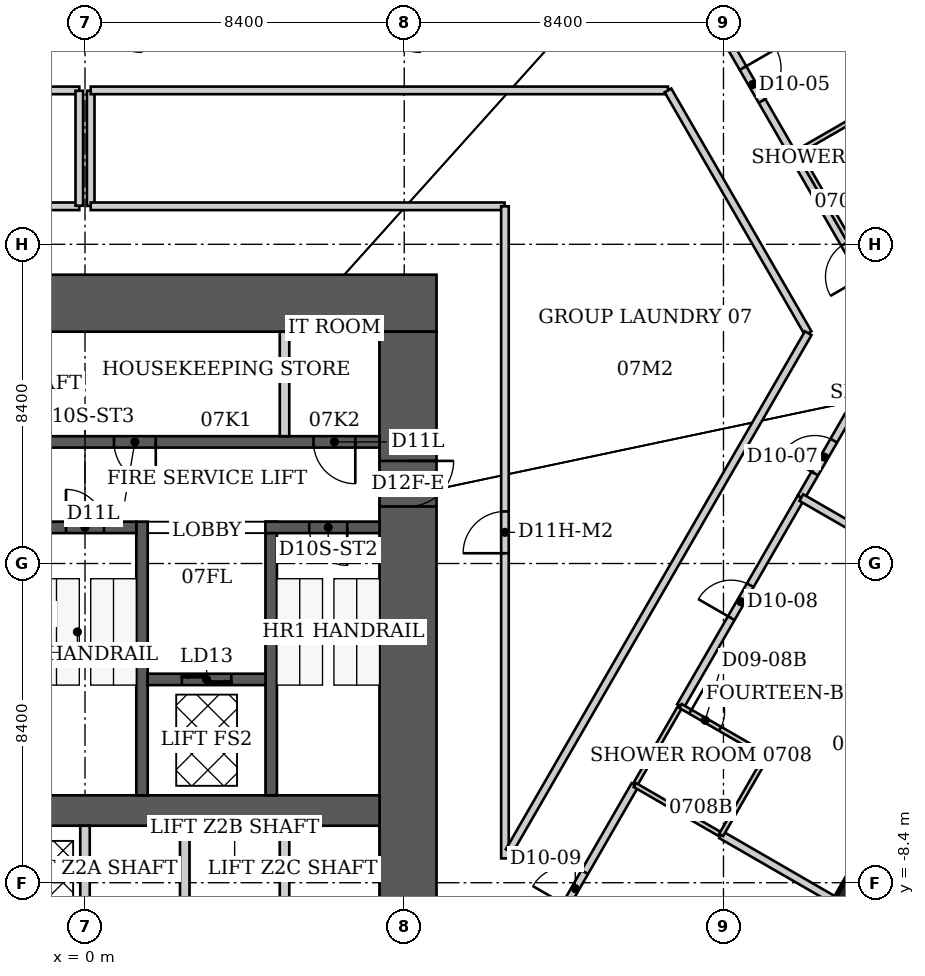
"""IFC4 building model, lengths in metres.
Left out: names, types, materials, properties, quantities, classifications, styles, units other than length and angle.
Written with IfcOpenShell. Run it as: python <this file> out.ifc"""

import sys

from ifc_helpers import new_model, si_unit, direction, frame, frame_2d, origin, origin_2d, place, context, subcontext, project, spatial, rectangle, extrude, element, fill, save


model = new_model("IFC4")
c1 = context("Model", 3, precision=1e-05, world=origin(), true_north=direction((0.0, 1.0)))
c2 = subcontext(c1, "Body", "Model", "MODEL_VIEW")
j1 = project(units=[si_unit("LENGTHUNIT", "METRE"), si_unit("PLANEANGLEUNIT", "RADIAN")], contexts=[c1])
p1 = place(None, origin())
s1 = spatial("IfcSite", under=j1, at=p1, CompositionType="ELEMENT")
p2 = place(p1, origin())
s2 = spatial("IfcBuilding", under=s1, at=p2, CompositionType="ELEMENT")
p3 = place(p2, frame((0.0, 0.0, 34.4)))
s3 = spatial("IfcBuildingStorey", under=s2, at=p3, CompositionType="ELEMENT", Elevation=34.4)
p4 = place(p3, frame((20.701, -9.521, 0.0), z_axis=(0.0, 0.0, 1.0), x_axis=(0.866025403784, -0.5, 0.0)))
e1 = element("IfcColumn", 1, at=p4, inside=s3, PredefinedType="COLUMN", context=c2, shape_type="SweptSolid", body=[
    extrude(rectangle(XDim=2.4, YDim=2.4, at=origin_2d()), origin(), (0.0, 0.0, 1.0), 3.8),
])
p5 = place(p3, frame((-9.25, 6.85, 0.0), z_axis=(0.0, 0.0, 1.0), x_axis=(1.0, 0.0, 0.0)))
e2 = element("IfcWall", 2, at=p5, inside=s3, PredefinedType="SHEAR", context=c2, shape_type="SweptSolid", body=[
    extrude(rectangle(XDim=18.5, YDim=1.5, at=frame_2d((9.25, 0.0))), origin(), (0.0, 0.0, 1.0), 3.8),
])
p6 = place(p3, frame((8.5, -9.2, 0.0), z_axis=(0.0, 0.0, 1.0), x_axis=(0.0, 1.0, 0.0)))
e3 = element("IfcWall", 3, at=p6, inside=s3, PredefinedType="SHEAR", context=c2, shape_type="SweptSolid", body=[
    extrude(rectangle(XDim=15.3, YDim=1.5, at=frame_2d((7.65, 0.0))), origin(), (0.0, 0.0, 1.0), 3.8),
])
p7 = place(p6, frame((10.7, 0.0, 0.0)))
e4 = element("IfcOpeningElement", 4, at=p7, cuts=e3, PredefinedType="OPENING", context=c2, shape_type="SweptSolid", body=[
    extrude(rectangle(XDim=1.2, YDim=2.2, at=frame_2d((0.6, 1.1))), frame((0.0, 0.75, 0.0), z_axis=(0.0, -1.0, 0.0), x_axis=(1.0, 0.0, 0.0)), (0.0, 0.0, 1.0), 1.5),
])
p8 = place(p3, frame((-7.75, -6.5, 0.0), z_axis=(0.0, 0.0, 1.0), x_axis=(1.0, 0.0, 0.0)))
e5 = element("IfcWall", 5, at=p8, inside=s3, PredefinedType="SHEAR", context=c2, shape_type="SweptSolid", body=[
    extrude(rectangle(XDim=15.5, YDim=0.8, at=frame_2d((7.75, 0.0))), origin(), (0.0, 0.0, 1.0), 3.8),
])
for number, where, z_axis, x_axis in (
    (6, (1.5, -6.1, 0.0), (0.0, 0.0, 1.0), (0.0, 1.0, 0.0)),
    (7, (4.9, -6.1, 0.0), (0.0, 0.0, 1.0), (0.0, 1.0, 0.0)),
):
    element("IfcWall", number, at=place(p3, frame(where, z_axis=z_axis, x_axis=x_axis)), inside=s3, PredefinedType="SHEAR", context=c2, shape_type="SweptSolid", body=[
        extrude(rectangle(XDim=7.2, YDim=0.3, at=frame_2d((3.6, 0.0))), origin(), (0.0, 0.0, 1.0), 3.8),
    ])
p9 = place(p3, frame((-1.35, 0.95, 0.0), z_axis=(0.0, 0.0, 1.0), x_axis=(1.0, 0.0, 0.0)))
e8 = element("IfcWall", 8, at=p9, inside=s3, PredefinedType="SHEAR", context=c2, shape_type="SweptSolid", body=[
    extrude(rectangle(XDim=2.7, YDim=0.3, at=frame_2d((1.35, 0.0))), origin(), (0.0, 0.0, 1.0), 3.8),
])
p10 = place(p9, frame((0.85, 0.0, 0.0)))
e9 = element("IfcOpeningElement", 9, at=p10, cuts=e8, PredefinedType="OPENING", context=c2, shape_type="SweptSolid", body=[
    extrude(rectangle(XDim=1.0, YDim=2.2, at=frame_2d((0.5, 1.1))), frame((0.0, 0.15, 0.0), z_axis=(0.0, -1.0, 0.0), x_axis=(1.0, 0.0, 0.0)), (0.0, 0.0, 1.0), 0.3),
])
p11 = place(p3, frame((4.75, 0.95, 0.0), z_axis=(0.0, 0.0, 1.0), x_axis=(1.0, 0.0, 0.0)))
e10 = element("IfcWall", 10, at=p11, inside=s3, PredefinedType="SHEAR", context=c2, shape_type="SweptSolid", body=[
    extrude(rectangle(XDim=3.0, YDim=0.3, at=frame_2d((1.5, 0.0))), origin(), (0.0, 0.0, 1.0), 3.8),
])
p12 = place(p11, frame((1.15, 0.0, 0.0)))
e11 = element("IfcOpeningElement", 11, at=p12, cuts=e10, PredefinedType="OPENING", context=c2, shape_type="SweptSolid", body=[
    extrude(rectangle(XDim=1.0, YDim=2.2, at=frame_2d((0.5, 1.1))), frame((0.0, 0.15, 0.0), z_axis=(0.0, -1.0, 0.0), x_axis=(1.0, 0.0, 0.0)), (0.0, 0.0, 1.0), 0.3),
])
p13 = place(p3, frame((1.65, -3.05, 0.0), z_axis=(0.0, 0.0, 1.0), x_axis=(1.0, 0.0, 0.0)))
e12 = element("IfcWall", 12, at=p13, inside=s3, PredefinedType="SHEAR", context=c2, shape_type="SweptSolid", body=[
    extrude(rectangle(XDim=3.1, YDim=0.3, at=frame_2d((1.55, 0.0))), origin(), (0.0, 0.0, 1.0), 3.8),
])
p14 = place(p13, frame((0.9, 0.0, 0.0)))
e13 = element("IfcOpeningElement", 13, at=p14, cuts=e12, PredefinedType="OPENING", context=c2, shape_type="SweptSolid", body=[
    extrude(rectangle(XDim=1.3, YDim=2.1, at=frame_2d((0.65, 1.05))), frame((0.0, 0.15, 0.0), z_axis=(0.0, -1.0, 0.0), x_axis=(1.0, 0.0, 0.0)), (0.0, 0.0, 1.0), 0.3),
])
p15 = place(p3, frame((-7.75, 3.2, 0.0), z_axis=(0.0, 0.0, 1.0), x_axis=(1.0, 0.0, 0.0)))
e14 = element("IfcWall", 14, at=p15, inside=s3, PredefinedType="SHEAR", context=c2, shape_type="SweptSolid", body=[
    extrude(rectangle(XDim=15.5, YDim=0.3, at=frame_2d((7.75, 0.0))), origin(), (0.0, 0.0, 1.0), 3.8),
])
p16 = place(p15, frame((8.512, 0.0, 0.0)))
e15 = element("IfcOpeningElement", 15, at=p16, cuts=e14, PredefinedType="OPENING", context=c2, shape_type="SweptSolid", body=[
    extrude(rectangle(XDim=1.1, YDim=2.2, at=frame_2d((0.55, 1.1))), frame((0.0, 0.15, 0.0), z_axis=(0.0, -1.0, 0.0), x_axis=(1.0, 0.0, 0.0)), (0.0, 0.0, 1.0), 0.3),
])
p17 = place(p15, frame((13.762, 0.0, 0.0)))
e16 = element("IfcOpeningElement", 16, at=p17, cuts=e14, PredefinedType="OPENING", context=c2, shape_type="SweptSolid", body=[
    extrude(rectangle(XDim=1.1, YDim=2.2, at=frame_2d((0.55, 1.1))), frame((0.0, 0.15, 0.0), z_axis=(0.0, -1.0, 0.0), x_axis=(1.0, 0.0, 0.0)), (0.0, 0.0, 1.0), 0.3),
])
p18 = place(p3, frame((5.25, 3.35, 0.0), z_axis=(0.0, 0.0, 1.0), x_axis=(0.0, 1.0, 0.0)))
e17 = element("IfcWall", 17, at=p18, inside=s3, PredefinedType="PARTITIONING", context=c2, shape_type="SweptSolid", body=[
    extrude(rectangle(XDim=2.75, YDim=0.25, at=frame_2d((1.375, 0.0))), origin(), (0.0, 0.0, 1.0), 3.8),
])
for number, where, z_axis, x_axis in (
    (18, (0.0, -9.2, 0.0), (0.0, 0.0, 1.0), (0.0, 1.0, 0.0)),
    (19, (2.625, -9.2, 0.0), (0.0, 0.0, 1.0), (0.0, 1.0, 0.0)),
    (20, (5.25, -9.2, 0.0), (0.0, 0.0, 1.0), (0.0, 1.0, 0.0)),
):
    element("IfcWall", number, at=place(p3, frame(where, z_axis=z_axis, x_axis=x_axis)), inside=s3, PredefinedType="PARTITIONING", context=c2, shape_type="SweptSolid", body=[
        extrude(rectangle(XDim=2.3, YDim=0.25, at=frame_2d((1.15, 0.0))), origin(), (0.0, 0.0, 1.0), 3.8),
    ])
p19 = place(p3, frame((-11.88, 12.45, 0.0), z_axis=(0.0, 0.0, 1.0), x_axis=(1.0, 0.0, 0.0)))
e21 = element("IfcWall", 21, at=p19, inside=s3, PredefinedType="PARTITIONING", context=c2, shape_type="SweptSolid", body=[
    extrude(rectangle(XDim=11.73, YDim=0.2, at=frame_2d((5.865, 0.0))), origin(), (0.0, 0.0, 1.0), 3.64),
])
p20 = place(p3, frame((-0.15, 9.4, 0.0), z_axis=(0.0, 0.0, 1.0), x_axis=(-1.0, 0.0, 0.0)))
e22 = element("IfcWall", 22, at=p20, inside=s3, PredefinedType="PARTITIONING", context=c2, shape_type="SweptSolid", body=[
    extrude(rectangle(XDim=10.89, YDim=0.2, at=frame_2d((5.445, 0.0))), origin(), (0.0, 0.0, 1.0), 3.64),
])
p21 = place(p3, frame((-0.15, 12.44, 0.0), z_axis=(0.0, 0.0, 1.0), x_axis=(0.0, -1.0, 0.0)))
e23 = element("IfcWall", 23, at=p21, inside=s3, PredefinedType="PARTITIONING", context=c2, shape_type="SweptSolid", body=[
    extrude(rectangle(XDim=3.025, YDim=0.2, at=frame_2d((1.512, 0.0))), origin(), (0.0, 0.0, 1.0), 3.64),
])
p22 = place(p3, frame((0.15, 9.41, 0.0), z_axis=(0.0, 0.0, 1.0), x_axis=(0.0, 1.0, 0.0)))
e24 = element("IfcWall", 24, at=p22, inside=s3, PredefinedType="PARTITIONING", context=c2, shape_type="SweptSolid", body=[
    extrude(rectangle(XDim=3.03, YDim=0.2, at=frame_2d((1.515, 0.0))), origin(), (0.0, 0.0, 1.0), 3.64),
])
p23 = place(p3, frame((0.15, 12.45, 0.0), z_axis=(0.0, 0.0, 1.0), x_axis=(1.0, 0.0, 0.0)))
e25 = element("IfcWall", 25, at=p23, inside=s3, PredefinedType="PARTITIONING", context=c2, shape_type="SweptSolid", body=[
    extrude(rectangle(XDim=15.19, YDim=0.2, at=frame_2d((7.595, 0.0))), origin(), (0.0, 0.0, 1.0), 3.64),
])
p24 = place(p3, frame((11.04, 9.4, 0.0), z_axis=(0.0, 0.0, 1.0), x_axis=(-1.0, 0.0, 0.0)))
e26 = element("IfcWall", 26, at=p24, inside=s3, PredefinedType="PARTITIONING", context=c2, shape_type="SweptSolid", body=[
    extrude(rectangle(XDim=10.89, YDim=0.2, at=frame_2d((5.445, 0.0))), origin(), (0.0, 0.0, 1.0), 3.64),
])
p25 = place(p3, frame((11.05, -7.76, 0.0), z_axis=(0.0, 0.0, 1.0), x_axis=(0.0, 1.0, 0.0)))
e27 = element("IfcWall", 27, at=p25, inside=s3, PredefinedType="PARTITIONING", context=c2, shape_type="SweptSolid", body=[
    extrude(rectangle(XDim=17.16, YDim=0.2, at=frame_2d((8.58, 0.0))), origin(), (0.0, 0.0, 1.0), 3.64),
])
p26 = place(p25, frame((8.03, 0.0, 0.0)))
e28 = element("IfcOpeningElement", 28, at=p26, cuts=e27, PredefinedType="OPENING", context=c2, shape_type="SweptSolid", body=[
    extrude(rectangle(XDim=1.1, YDim=2.2, at=frame_2d((0.55, 1.1))), frame((0.0, 0.1, 0.0), z_axis=(0.0, -1.0, 0.0), x_axis=(1.0, 0.0, 0.0)), (0.0, 0.0, 1.0), 0.2),
])
p27 = place(p3, frame((11.33, -11.28, 0.0), z_axis=(0.0, 0.0, 1.0), x_axis=(0.499208241022, 0.866482043724, 0.0)))
e29 = element("IfcWall", 29, at=p27, inside=s3, PredefinedType="PARTITIONING", context=c2, shape_type="SweptSolid", body=[
    extrude(rectangle(XDim=6.29, YDim=0.2, at=frame_2d((3.145, 0.0))), origin(), (0.0, 0.0, 1.0), 3.64),
])
p28 = place(p27, frame((2.645, 0.0, 0.0)))
e30 = element("IfcOpeningElement", 30, at=p28, cuts=e29, PredefinedType="OPENING", context=c2, shape_type="SweptSolid", body=[
    extrude(rectangle(XDim=1.0, YDim=2.13, at=frame_2d((0.5, 1.065))), frame((0.0, 0.1, 0.0), z_axis=(0.0, -1.0, 0.0), x_axis=(1.0, 0.0, 0.0)), (0.0, 0.0, 1.0), 0.2),
])
p29 = place(p3, frame((14.47, -5.83, 0.0), z_axis=(0.0, 0.0, 1.0), x_axis=(0.499693115345, 0.866202511239, 0.0)))
e31 = element("IfcWall", 31, at=p29, inside=s3, PredefinedType="PARTITIONING", context=c2, shape_type="SweptSolid", body=[
    extrude(rectangle(XDim=2.401, YDim=0.12, at=frame_2d((1.201, 0.0))), origin(), (0.0, 0.0, 1.0), 3.64),
])
p30 = place(p3, frame((14.47, -5.83, 0.0), z_axis=(0.0, 0.0, 1.0), x_axis=(0.866010296064, -0.500026166427, 0.0)))
e32 = element("IfcWall", 32, at=p30, inside=s3, PredefinedType="PARTITIONING", context=c2, shape_type="SweptSolid", body=[
    extrude(rectangle(XDim=2.621, YDim=0.12, at=frame_2d((1.311, 0.0))), origin(), (0.0, 0.0, 1.0), 3.023),
])
p31 = place(p3, frame((15.34, 12.45, 0.0), z_axis=(0.0, 0.0, 1.0), x_axis=(0.500074726567, -0.865982256082, 0.0)))
e33 = element("IfcWall", 33, at=p31, inside=s3, PredefinedType="PARTITIONING", context=c2, shape_type="SweptSolid", body=[
    extrude(rectangle(XDim=7.379, YDim=0.2, at=frame_2d((3.689, 0.0))), origin(), (0.0, 0.0, 1.0), 3.64),
])
p32 = place(p3, frame((15.67, -3.75, 0.0), z_axis=(0.0, 0.0, 1.0), x_axis=(0.500061360627, 0.865989974311, 0.0)))
e34 = element("IfcWall", 34, at=p32, inside=s3, PredefinedType="PARTITIONING", context=c2, shape_type="SweptSolid", body=[
    extrude(rectangle(XDim=6.34, YDim=0.2, at=frame_2d((3.17, 0.0))), origin(), (0.0, 0.0, 1.0), 3.64),
])
p33 = place(p32, frame((2.67, 0.0, 0.0)))
e35 = element("IfcOpeningElement", 35, at=p33, cuts=e34, PredefinedType="OPENING", context=c2, shape_type="SweptSolid", body=[
    extrude(rectangle(XDim=1.0, YDim=2.13, at=frame_2d((0.5, 1.065))), frame((0.0, 0.1, 0.0), z_axis=(0.0, -1.0, 0.0), x_axis=(1.0, 0.0, 0.0)), (0.0, 0.0, 1.0), 0.2),
])
p34 = place(p3, frame((16.5, 14.45, 0.0), z_axis=(0.0, 0.0, 1.0), x_axis=(0.499689380994, -0.866204665493, 0.0)))
e36 = element("IfcWall", 36, at=p34, inside=s3, PredefinedType="PARTITIONING", context=c2, shape_type="SweptSolid", body=[
    extrude(rectangle(XDim=4.26, YDim=0.2, at=frame_2d((2.13, 0.0))), origin(), (0.0, 0.0, 1.0), 3.64),
])
p35 = place(p34, frame((1.63, 0.0, 0.0)))
e37 = element("IfcOpeningElement", 37, at=p35, cuts=e36, PredefinedType="OPENING", context=c2, shape_type="SweptSolid", body=[
    extrude(rectangle(XDim=1.0, YDim=2.13, at=frame_2d((0.5, 1.065))), frame((0.0, 0.1, 0.0), z_axis=(0.0, -1.0, 0.0), x_axis=(1.0, 0.0, 0.0)), (0.0, 0.0, 1.0), 0.2),
])
p36 = place(p3, frame((16.74, -7.141, 0.0), z_axis=(0.0, 0.0, 1.0), x_axis=(0.865985044037, -0.500069898618, 0.0)))
e38 = element("IfcWall", 38, at=p36, inside=s3, PredefinedType="PARTITIONING", context=c2, shape_type="SweptSolid", body=[
    extrude(rectangle(XDim=5.758, YDim=0.2, at=frame_2d((2.879, 0.0))), origin(), (0.0, 0.0, 1.0), 3.023),
])
p37 = place(p3, frame((16.74, -7.14, 0.0), z_axis=(0.0, 0.0, 1.0), x_axis=(0.499737123639, 0.866177122335, 0.0)))
e39 = element("IfcWall", 39, at=p37, inside=s3, PredefinedType="PARTITIONING", context=c2, shape_type="SweptSolid", body=[
    extrude(rectangle(XDim=2.401, YDim=0.12, at=frame_2d((1.201, 0.0))), origin(), (0.0, 0.0, 1.0), 3.64),
])
p38 = place(p3, frame((17.94, -5.06, 0.0), z_axis=(0.0, 0.0, 1.0), x_axis=(-0.866114241029, 0.499846097802, 0.0)))
e40 = element("IfcWall", 40, at=p38, inside=s3, PredefinedType="PARTITIONING", context=c2, shape_type="SweptSolid", body=[
    extrude(rectangle(XDim=2.621, YDim=0.12, at=frame_2d((1.311, 0.0))), origin(), (0.0, 0.0, 1.0), 3.64),
])
p39 = place(p38, frame((1.421, 0.0, 0.0)))
e41 = element("IfcOpeningElement", 41, at=p39, cuts=e40, PredefinedType="OPENING", context=c2, shape_type="SweptSolid", body=[
    extrude(rectangle(XDim=0.9, YDim=2.03, at=frame_2d((0.45, 1.015))), frame((0.0, 0.06, 0.0), z_axis=(0.0, -1.0, 0.0), x_axis=(1.0, 0.0, 0.0)), (0.0, 0.0, 1.0), 0.12),
])
p40 = place(p3, frame((18.629, 10.76, 0.0), z_axis=(0.0, 0.0, 1.0), x_axis=(0.499715960807, -0.866189331794, 0.0)))
e42 = element("IfcWall", 42, at=p40, inside=s3, PredefinedType="PARTITIONING", context=c2, shape_type="SweptSolid", body=[
    extrude(rectangle(XDim=5.426, YDim=0.2, at=frame_2d((2.713, 0.0))), origin(), (0.0, 0.0, 1.0), 3.64),
])
p41 = place(p40, frame((2.713, 0.0, 0.0)))
e43 = element("IfcOpeningElement", 43, at=p41, cuts=e42, PredefinedType="OPENING", context=c2, shape_type="SweptSolid", body=[
    extrude(rectangle(XDim=1.0, YDim=2.13, at=frame_2d((0.5, 1.065))), frame((0.0, 0.1, 0.0), z_axis=(0.0, -1.0, 0.0), x_axis=(1.0, 0.0, 0.0)), (0.0, 0.0, 1.0), 0.2),
])
p42 = place(p3, frame((18.639, 10.765, 0.0), z_axis=(0.0, 0.0, 1.0), x_axis=(0.865830913258, 0.500336716268, 0.0)))
e44 = element("IfcWall", 44, at=p42, inside=s3, PredefinedType="PARTITIONING", context=c2, shape_type="SweptSolid", body=[
    extrude(rectangle(XDim=0.138, YDim=0.2, at=frame_2d((0.069, 0.0))), origin(), (0.0, 0.0, 1.0), 3.64),
])
p43 = place(p3, frame((18.758, 10.834, 0.0), z_axis=(0.0, 0.0, 1.0), x_axis=(0.865975636842, 0.500086188968, 0.0)))
e45 = element("IfcWall", 45, at=p43, inside=s3, PredefinedType="PARTITIONING", context=c2, shape_type="SweptSolid", body=[
    extrude(rectangle(XDim=2.401, YDim=0.12, at=frame_2d((1.201, 0.0))), origin(), (0.0, 0.0, 1.0), 2.86),
])
p44 = place(p3, frame((18.76, 10.83, 0.0), z_axis=(0.0, 0.0, 1.0), x_axis=(0.500291685314, -0.865856933682, 0.0)))
e46 = element("IfcWall", 46, at=p44, inside=s3, PredefinedType="PARTITIONING", context=c2, shape_type="SweptSolid", body=[
    extrude(rectangle(XDim=2.599, YDim=0.12, at=frame_2d((1.299, 0.0))), origin(), (0.0, 0.0, 1.0), 3.64),
])
p45 = place(p3, frame((18.84, 1.74, 0.0), z_axis=(0.0, 0.0, 1.0), x_axis=(0.500348958043, 0.865823839003, 0.0)))
e47 = element("IfcWall", 47, at=p45, inside=s3, PredefinedType="PARTITIONING", context=c2, shape_type="SweptSolid", body=[
    extrude(rectangle(XDim=2.451, YDim=0.2, at=frame_2d((1.226, 0.0))), origin(), (0.0, 0.0, 1.0), 3.64),
])
p46 = place(p45, frame((0.726, 0.0, 0.0)))
e48 = element("IfcOpeningElement", 48, at=p46, cuts=e47, PredefinedType="OPENING", context=c2, shape_type="SweptSolid", body=[
    extrude(rectangle(XDim=1.0, YDim=2.13, at=frame_2d((0.5, 1.065))), frame((0.0, 0.1, 0.0), z_axis=(0.0, -1.0, 0.0), x_axis=(1.0, 0.0, 0.0)), (0.0, 0.0, 1.0), 0.2),
])
p47 = place(p3, frame((19.03, 6.06, 0.0), z_axis=(0.0, 0.0, 1.0), x_axis=(-0.500049636372, -0.865996744315, 0.0)))
e49 = element("IfcWall", 49, at=p47, inside=s3, PredefinedType="PARTITIONING", context=c2, shape_type="SweptSolid", body=[
    extrude(rectangle(XDim=15.739, YDim=0.2, at=frame_2d((7.869, 0.0))), origin(), (0.0, 0.0, 1.0), 3.64),
])
p48 = place(p3, frame((20.07, 3.86, 0.0), z_axis=(0.0, 0.0, 1.0), x_axis=(0.499963722229, 0.866046347752, 0.0)))
e50 = element("IfcWall", 50, at=p48, inside=s3, PredefinedType="PARTITIONING", context=c2, shape_type="SweptSolid", body=[
    extrude(rectangle(XDim=2.54, YDim=0.2, at=frame_2d((1.27, 0.0))), origin(), (0.0, 0.0, 1.0), 3.64),
])
p49 = place(p3, frame((26.096, -2.45, 0.0), z_axis=(0.0, 0.0, 1.0), x_axis=(-0.866002919298, 0.500038942252, 0.0)))
e51 = element("IfcWall", 51, at=p49, inside=s3, PredefinedType="PARTITIONING", context=c2, shape_type="SweptSolid", body=[
    extrude(rectangle(XDim=8.369, YDim=0.2, at=frame_2d((4.185, 0.0))), origin(), (0.0, 0.0, 1.0), 3.64),
])
p50 = place(p35, origin())
e52 = element("IfcDoor", 52, at=p50, inside=s3, OperationType="SINGLE_SWING_LEFT", PredefinedType="DOOR", context=c2, shape_type="SweptSolid", body=[
    extrude(rectangle(XDim=1.0, YDim=2.13, at=frame_2d((0.5, 1.065))), frame((0.0, 0.025, 0.0), z_axis=(0.0, -1.0, 0.0), x_axis=(1.0, 0.0, 0.0)), (0.0, 0.0, 1.0), 0.05),
])
fill(e37, e52)
p51 = place(p41, origin())
e53 = element("IfcDoor", 53, at=p51, inside=s3, OperationType="SINGLE_SWING_RIGHT", PredefinedType="DOOR", context=c2, shape_type="SweptSolid", body=[
    extrude(rectangle(XDim=1.0, YDim=2.13, at=frame_2d((0.5, 1.065))), frame((0.0, 0.025, 0.0), z_axis=(0.0, -1.0, 0.0), x_axis=(1.0, 0.0, 0.0)), (0.0, 0.0, 1.0), 0.05),
])
fill(e43, e53)
p52 = place(p46, origin())
e54 = element("IfcDoor", 54, at=p52, inside=s3, OperationType="SINGLE_SWING_LEFT", PredefinedType="DOOR", context=c2, shape_type="SweptSolid", body=[
    extrude(rectangle(XDim=1.0, YDim=2.13, at=frame_2d((0.5, 1.065))), frame((0.0, 0.025, 0.0), z_axis=(0.0, -1.0, 0.0), x_axis=(1.0, 0.0, 0.0)), (0.0, 0.0, 1.0), 0.05),
])
fill(e48, e54)
p53 = place(p33, origin())
e55 = element("IfcDoor", 55, at=p53, inside=s3, OperationType="SINGLE_SWING_LEFT", PredefinedType="DOOR", context=c2, shape_type="SweptSolid", body=[
    extrude(rectangle(XDim=1.0, YDim=2.13, at=frame_2d((0.5, 1.065))), frame((0.0, 0.025, 0.0), z_axis=(0.0, -1.0, 0.0), x_axis=(1.0, 0.0, 0.0)), (0.0, 0.0, 1.0), 0.05),
])
fill(e35, e55)
p54 = place(p39, origin())
e56 = element("IfcDoor", 56, at=p54, inside=s3, OperationType="SINGLE_SWING_RIGHT", PredefinedType="DOOR", context=c2, shape_type="SweptSolid", body=[
    extrude(rectangle(XDim=0.9, YDim=2.03, at=frame_2d((0.45, 1.015))), frame((0.0, 0.025, 0.0), z_axis=(0.0, -1.0, 0.0), x_axis=(1.0, 0.0, 0.0)), (0.0, 0.0, 1.0), 0.05),
])
fill(e41, e56)
p55 = place(p28, origin())
e57 = element("IfcDoor", 57, at=p55, inside=s3, OperationType="SINGLE_SWING_LEFT", PredefinedType="DOOR", context=c2, shape_type="SweptSolid", body=[
    extrude(rectangle(XDim=1.0, YDim=2.13, at=frame_2d((0.5, 1.065))), frame((0.0, 0.025, 0.0), z_axis=(0.0, -1.0, 0.0), x_axis=(1.0, 0.0, 0.0)), (0.0, 0.0, 1.0), 0.05),
])
fill(e30, e57)
p56 = place(p26, origin())
e58 = element("IfcDoor", 58, at=p56, inside=s3, OperationType="SINGLE_SWING_LEFT", PredefinedType="DOOR", context=c2, shape_type="SweptSolid", body=[
    extrude(rectangle(XDim=1.1, YDim=2.2, at=frame_2d((0.55, 1.1))), frame((0.0, 0.025, 0.0), z_axis=(0.0, -1.0, 0.0), x_axis=(1.0, 0.0, 0.0)), (0.0, 0.0, 1.0), 0.05),
])
fill(e28, e58)
p57 = place(p10, origin())
e59 = element("IfcDoor", 59, at=p57, inside=s3, OperationType="SINGLE_SWING_LEFT", PredefinedType="DOOR", context=c2, shape_type="SweptSolid", body=[
    extrude(rectangle(XDim=1.0, YDim=2.2, at=frame_2d((0.5, 1.1))), frame((0.0, 0.025, 0.0), z_axis=(0.0, -1.0, 0.0), x_axis=(1.0, 0.0, 0.0)), (0.0, 0.0, 1.0), 0.05),
])
fill(e9, e59)
p58 = place(p12, origin())
e60 = element("IfcDoor", 60, at=p58, inside=s3, OperationType="SINGLE_SWING_RIGHT", PredefinedType="DOOR", context=c2, shape_type="SweptSolid", body=[
    extrude(rectangle(XDim=1.0, YDim=2.2, at=frame_2d((0.5, 1.1))), frame((0.0, 0.025, 0.0), z_axis=(0.0, -1.0, 0.0), x_axis=(1.0, 0.0, 0.0)), (0.0, 0.0, 1.0), 0.05),
])
fill(e11, e60)
p59 = place(p7, origin())
e61 = element("IfcDoor", 61, at=p59, inside=s3, OperationType="SINGLE_SWING_RIGHT", PredefinedType="DOOR", context=c2, shape_type="SweptSolid", body=[
    extrude(rectangle(XDim=1.2, YDim=2.2, at=frame_2d((0.6, 1.1))), frame((0.0, 0.025, 0.0), z_axis=(0.0, -1.0, 0.0), x_axis=(1.0, 0.0, 0.0)), (0.0, 0.0, 1.0), 0.05),
])
fill(e4, e61)
p60 = place(p16, origin())
e62 = element("IfcDoor", 62, at=p60, inside=s3, OperationType="SINGLE_SWING_RIGHT", PredefinedType="DOOR", context=c2, shape_type="SweptSolid", body=[
    extrude(rectangle(XDim=1.1, YDim=2.2, at=frame_2d((0.55, 1.1))), frame((0.0, 0.025, 0.0), z_axis=(0.0, -1.0, 0.0), x_axis=(1.0, 0.0, 0.0)), (0.0, 0.0, 1.0), 0.05),
])
fill(e15, e62)
p61 = place(p17, origin())
e63 = element("IfcDoor", 63, at=p61, inside=s3, OperationType="SINGLE_SWING_RIGHT", PredefinedType="DOOR", context=c2, shape_type="SweptSolid", body=[
    extrude(rectangle(XDim=1.1, YDim=2.2, at=frame_2d((0.55, 1.1))), frame((0.0, 0.025, 0.0), z_axis=(0.0, -1.0, 0.0), x_axis=(1.0, 0.0, 0.0)), (0.0, 0.0, 1.0), 0.05),
])
fill(e16, e63)
p62 = place(p14, origin())
e64 = element("IfcDoor", 64, at=p62, inside=s3, OperationType="DOUBLE_DOOR_SLIDING", PredefinedType="DOOR", context=c2, shape_type="SweptSolid", body=[
    extrude(rectangle(XDim=1.3, YDim=2.1, at=frame_2d((0.65, 1.05))), frame((0.0, 0.025, 0.0), z_axis=(0.0, -1.0, 0.0), x_axis=(1.0, 0.0, 0.0)), (0.0, 0.0, 1.0), 0.05),
])
fill(e13, e64)
save(model, sys.argv[1])
